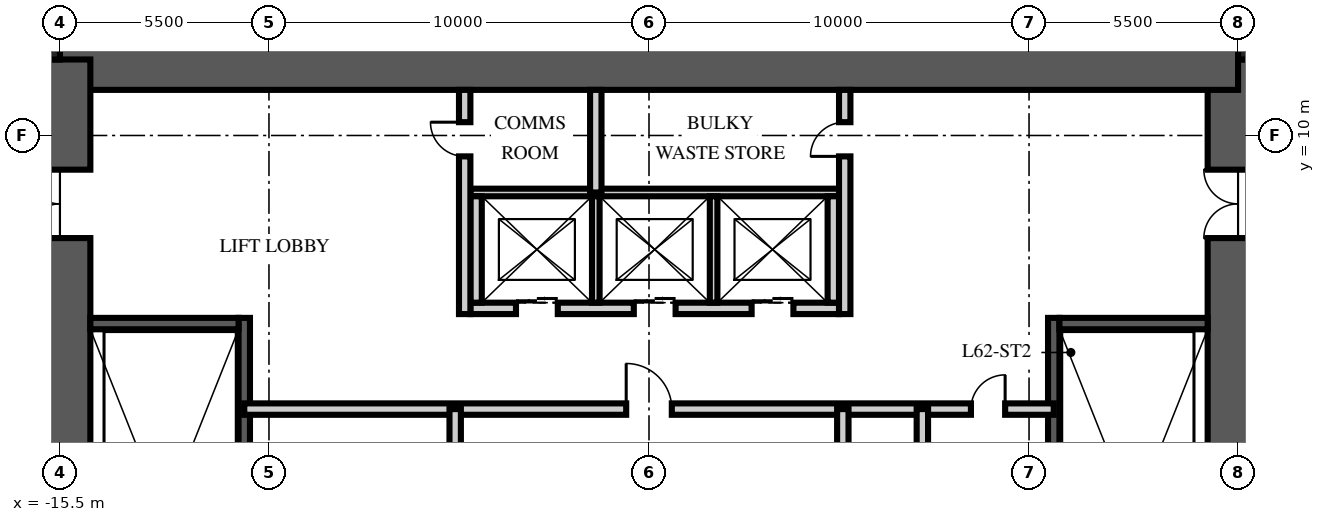
"""IFC4 building model, lengths in metres.
Left out: names, types, materials, properties, quantities, classifications, styles, units other than length and angle.
Written with IfcOpenShell. Run it as: python <this file> out.ifc"""

import sys

from ifc_helpers import new_model, si_unit, direction, frame, frame_2d, origin, origin_2d, place, context, subcontext, project, spatial, rectangle, extrude, element, fill, save


model = new_model("IFC4")
c1 = context("Model", 3, precision=1e-05, world=origin(), true_north=direction((0.0, 1.0)))
c2 = subcontext(c1, "Body", "Model", "MODEL_VIEW")
j1 = project(units=[si_unit("LENGTHUNIT", "METRE"), si_unit("PLANEANGLEUNIT", "RADIAN")], contexts=[c1])
p1 = place(None, origin())
s1 = spatial("IfcSite", under=j1, at=p1, CompositionType="ELEMENT")
p2 = place(p1, origin())
s2 = spatial("IfcBuilding", under=s1, at=p2, CompositionType="ELEMENT")
p3 = place(p2, frame((0.0, 0.0, 248.25)))
s3 = spatial("IfcBuildingStorey", under=s2, at=p3, CompositionType="ELEMENT", Elevation=248.25)
p4 = place(p3, frame((15.5, -12.0, -0.25), z_axis=(0.0, 0.0, 1.0), x_axis=(0.0, 1.0, 0.0)))
e1 = element("IfcWall", 1, at=p4, inside=s3, PredefinedType="SHEAR", context=c2, shape_type="SweptSolid", body=[
    extrude(rectangle(XDim=24.0, YDim=1.6, at=frame_2d((12.0, 0.0))), origin(), (0.0, 0.0, 1.0), 3.75),
])
p5 = place(p4, frame((3.2, 0.0, 0.25)))
e2 = element("IfcOpeningElement", 2, at=p5, cuts=e1, PredefinedType="OPENING", context=c2, shape_type="SweptSolid", body=[
    extrude(rectangle(XDim=1.2, YDim=2.1, at=frame_2d((0.6, 1.05))), frame((0.0, 0.81, 0.0), z_axis=(0.0, -1.0, 0.0), x_axis=(1.0, 0.0, 0.0)), (0.0, 0.0, 1.0), 1.62),
])
p6 = place(p4, frame((19.3, 0.0, 0.25)))
e3 = element("IfcOpeningElement", 3, at=p6, cuts=e1, PredefinedType="OPENING", context=c2, shape_type="SweptSolid", body=[
    extrude(rectangle(XDim=1.8, YDim=2.1, at=frame_2d((0.9, 1.05))), frame((0.0, 0.81, 0.0), z_axis=(0.0, -1.0, 0.0), x_axis=(1.0, 0.0, 0.0)), (0.0, 0.0, 1.0), 1.62),
])
p7 = place(p3, frame((-15.5, 12.0, -0.25), z_axis=(0.0, 0.0, 1.0), x_axis=(1.0, 0.0, 0.0)))
e4 = element("IfcWall", 4, at=p7, inside=s3, PredefinedType="SHEAR", context=c2, shape_type="SweptSolid", body=[
    extrude(rectangle(XDim=31.0, YDim=1.6, at=frame_2d((15.5, 0.0))), origin(), (0.0, 0.0, 1.0), 3.75),
])
p8 = place(p3, frame((-15.5, -12.0, -0.25), z_axis=(0.0, 0.0, 1.0), x_axis=(0.0, 1.0, 0.0)))
e5 = element("IfcWall", 5, at=p8, inside=s3, PredefinedType="SHEAR", context=c2, shape_type="SweptSolid", body=[
    extrude(rectangle(XDim=24.0, YDim=1.6, at=frame_2d((12.0, 0.0))), origin(), (0.0, 0.0, 1.0), 3.75),
])
p9 = place(p8, frame((3.2, 0.0, 0.25)))
e6 = element("IfcOpeningElement", 6, at=p9, cuts=e5, PredefinedType="OPENING", context=c2, shape_type="SweptSolid", body=[
    extrude(rectangle(XDim=1.2, YDim=2.1, at=frame_2d((0.6, 1.05))), frame((0.0, 0.81, 0.0), z_axis=(0.0, -1.0, 0.0), x_axis=(1.0, 0.0, 0.0)), (0.0, 0.0, 1.0), 1.62),
])
p10 = place(p8, frame((19.3, 0.0, 0.25)))
e7 = element("IfcOpeningElement", 7, at=p10, cuts=e5, PredefinedType="OPENING", context=c2, shape_type="SweptSolid", body=[
    extrude(rectangle(XDim=1.8, YDim=2.1, at=frame_2d((0.9, 1.05))), frame((0.0, 0.81, 0.0), z_axis=(0.0, -1.0, 0.0), x_axis=(1.0, 0.0, 0.0)), (0.0, 0.0, 1.0), 1.62),
])
for number, where, z_axis, x_axis in (
    (8, (15.9, 12.4, -0.25), (0.0, 0.0, 1.0), (1.0, 0.0, 0.0)),
    (9, (-15.9, 12.4, -0.25), (0.0, 0.0, 1.0), (1.0, 0.0, 0.0)),
):
    element("IfcColumn", number, at=place(p3, frame(where, z_axis=z_axis, x_axis=x_axis)), inside=s3, PredefinedType="COLUMN", context=c2, shape_type="SweptSolid", body=[
        extrude(rectangle(XDim=0.8, YDim=0.8, at=origin_2d()), origin(), (0.0, 0.0, 1.0), 3.75),
    ])
p11 = place(p3, frame((-10.65, -4.9, 0.0), z_axis=(0.0, 0.0, 1.0), x_axis=(0.0, 1.0, 0.0)))
e10 = element("IfcWall", 10, at=p11, inside=s3, PredefinedType="SOLIDWALL", context=c2, shape_type="SweptSolid", body=[
    extrude(rectangle(XDim=10.1, YDim=0.3, at=frame_2d((5.05, 0.0))), origin(), (0.0, 0.0, 1.0), 3.5),
])
p12 = place(p3, frame((-14.7, 5.05, 0.0), z_axis=(0.0, 0.0, 1.0), x_axis=(1.0, 0.0, 0.0)))
e11 = element("IfcWall", 11, at=p12, inside=s3, PredefinedType="SOLIDWALL", context=c2, shape_type="SweptSolid", body=[
    extrude(rectangle(XDim=3.9, YDim=0.3, at=frame_2d((1.95, 0.0))), origin(), (0.0, 0.0, 1.0), 3.5),
])
p13 = place(p3, frame((10.65, -4.9, 0.0), z_axis=(0.0, 0.0, 1.0), x_axis=(0.0, 1.0, 0.0)))
e12 = element("IfcWall", 12, at=p13, inside=s3, PredefinedType="SOLIDWALL", context=c2, shape_type="SweptSolid", body=[
    extrude(rectangle(XDim=10.1, YDim=0.3, at=frame_2d((5.05, 0.0))), origin(), (0.0, 0.0, 1.0), 3.5),
])
p14 = place(p3, frame((14.7, 5.05, 0.0), z_axis=(0.0, 0.0, 1.0), x_axis=(-1.0, 0.0, 0.0)))
e13 = element("IfcWall", 13, at=p14, inside=s3, PredefinedType="SOLIDWALL", context=c2, shape_type="SweptSolid", body=[
    extrude(rectangle(XDim=3.9, YDim=0.3, at=frame_2d((1.95, 0.0))), origin(), (0.0, 0.0, 1.0), 3.5),
])
p15 = place(p3, frame((-4.7, 5.45, 0.0), z_axis=(0.0, 0.0, 1.0), x_axis=(1.0, 0.0, 0.0)))
e14 = element("IfcWall", 14, at=p15, inside=s3, PredefinedType="PARTITIONING", context=c2, shape_type="SweptSolid", body=[
    extrude(rectangle(XDim=9.7, YDim=0.3, at=frame_2d((4.85, 0.0))), origin(), (0.0, 0.0, 1.0), 3.5),
])
p16 = place(p15, frame((1.2, 0.0, 0.0)))
e15 = element("IfcOpeningElement", 15, at=p16, cuts=e14, PredefinedType="OPENING", context=c2, shape_type="SweptSolid", body=[
    extrude(rectangle(XDim=1.1, YDim=2.1, at=frame_2d((0.55, 1.05))), frame((0.0, 0.16, 0.0), z_axis=(0.0, -1.0, 0.0), x_axis=(1.0, 0.0, 0.0)), (0.0, 0.0, 1.0), 0.32),
])
p17 = place(p15, frame((4.3, 0.0, 0.0)))
e16 = element("IfcOpeningElement", 16, at=p17, cuts=e14, PredefinedType="OPENING", context=c2, shape_type="SweptSolid", body=[
    extrude(rectangle(XDim=1.1, YDim=2.1, at=frame_2d((0.55, 1.05))), frame((0.0, 0.16, 0.0), z_axis=(0.0, -1.0, 0.0), x_axis=(1.0, 0.0, 0.0)), (0.0, 0.0, 1.0), 0.32),
])
p18 = place(p15, frame((7.4, 0.0, 0.0)))
e17 = element("IfcOpeningElement", 17, at=p18, cuts=e14, PredefinedType="OPENING", context=c2, shape_type="SweptSolid", body=[
    extrude(rectangle(XDim=1.1, YDim=2.1, at=frame_2d((0.55, 1.05))), frame((0.0, 0.16, 0.0), z_axis=(0.0, -1.0, 0.0), x_axis=(1.0, 0.0, 0.0)), (0.0, 0.0, 1.0), 0.32),
])
p19 = place(p3, frame((-4.7, 8.5, 0.0), z_axis=(0.0, 0.0, 1.0), x_axis=(1.0, 0.0, 0.0)))
e18 = element("IfcWall", 18, at=p19, inside=s3, PredefinedType="PARTITIONING", context=c2, shape_type="SweptSolid", body=[
    extrude(rectangle(XDim=9.7, YDim=0.2, at=frame_2d((4.85, 0.0))), origin(), (0.0, 0.0, 1.0), 3.5),
])
for number, where, z_axis, x_axis in (
    (19, (-4.55, 5.6, 0.0), (0.0, 0.0, 1.0), (0.0, 1.0, 0.0)),
    (20, (4.85, 5.6, 0.0), (0.0, 0.0, 1.0), (0.0, 1.0, 0.0)),
):
    element("IfcWall", number, at=place(p3, frame(where, z_axis=z_axis, x_axis=x_axis)), inside=s3, PredefinedType="PARTITIONING", context=c2, shape_type="SweptSolid", body=[
        extrude(rectangle(XDim=2.8, YDim=0.3, at=frame_2d((1.4, 0.0))), origin(), (0.0, 0.0, 1.0), 3.5),
    ])
for number, where, z_axis, x_axis in (
    (21, (-1.4, 5.6, 0.0), (0.0, 0.0, 1.0), (0.0, 1.0, 0.0)),
    (22, (1.7, 5.6, 0.0), (0.0, 0.0, 1.0), (0.0, 1.0, 0.0)),
):
    element("IfcWall", number, at=place(p3, frame(where, z_axis=z_axis, x_axis=x_axis)), inside=s3, PredefinedType="PARTITIONING", context=c2, shape_type="SweptSolid", body=[
        extrude(rectangle(XDim=2.8, YDim=0.2, at=frame_2d((1.4, 0.0))), origin(), (0.0, 0.0, 1.0), 3.5),
    ])
p20 = place(p3, frame((-10.65, 2.8, 0.0), z_axis=(0.0, 0.0, 1.0), x_axis=(1.0, 0.0, 0.0)))
e23 = element("IfcWall", 23, at=p20, inside=s3, PredefinedType="PARTITIONING", context=c2, shape_type="SweptSolid", body=[
    extrude(rectangle(XDim=21.3, YDim=0.3, at=frame_2d((10.65, 0.0))), origin(), (0.0, 0.0, 1.0), 3.5),
])
p21 = place(p20, frame((10.05, 0.0, 0.0)))
e24 = element("IfcOpeningElement", 24, at=p21, cuts=e23, PredefinedType="OPENING", context=c2, shape_type="SweptSolid", body=[
    extrude(rectangle(XDim=1.2, YDim=2.1, at=frame_2d((0.6, 1.05))), frame((0.0, 0.16, 0.0), z_axis=(0.0, -1.0, 0.0), x_axis=(1.0, 0.0, 0.0)), (0.0, 0.0, 1.0), 0.32),
])
p22 = place(p20, frame((19.121, 0.0, 0.0)))
e25 = element("IfcOpeningElement", 25, at=p22, cuts=e23, PredefinedType="OPENING", context=c2, shape_type="SweptSolid", body=[
    extrude(rectangle(XDim=0.9, YDim=2.1, at=frame_2d((0.45, 1.05))), frame((0.0, 0.16, 0.0), z_axis=(0.0, -1.0, 0.0), x_axis=(1.0, 0.0, 0.0)), (0.0, 0.0, 1.0), 0.32),
])
p23 = place(p3, frame((-5.1, -6.65, 0.0), z_axis=(0.0, 0.0, 1.0), x_axis=(0.0, 1.0, 0.0)))
e26 = element("IfcWall", 26, at=p23, inside=s3, PredefinedType="PARTITIONING", context=c2, shape_type="SweptSolid", body=[
    extrude(rectangle(XDim=9.45, YDim=0.3, at=frame_2d((4.725, 0.0))), origin(), (0.0, 0.0, 1.0), 3.5),
])
p24 = place(p23, frame((2.648, 0.0, 0.0)))
e27 = element("IfcOpeningElement", 27, at=p24, cuts=e26, PredefinedType="OPENING", context=c2, shape_type="SweptSolid", body=[
    extrude(rectangle(XDim=0.9, YDim=2.1, at=frame_2d((0.45, 1.05))), frame((0.0, 0.16, 0.0), z_axis=(0.0, -1.0, 0.0), x_axis=(1.0, 0.0, 0.0)), (0.0, 0.0, 1.0), 0.32),
])
p25 = place(p23, frame((7.373, 0.0, 0.0)))
e28 = element("IfcOpeningElement", 28, at=p25, cuts=e26, PredefinedType="OPENING", context=c2, shape_type="SweptSolid", body=[
    extrude(rectangle(XDim=0.9, YDim=2.1, at=frame_2d((0.45, 1.05))), frame((0.0, 0.16, 0.0), z_axis=(0.0, -1.0, 0.0), x_axis=(1.0, 0.0, 0.0)), (0.0, 0.0, 1.0), 0.32),
])
p26 = place(p3, frame((5.1, -6.65, 0.0), z_axis=(0.0, 0.0, 1.0), x_axis=(0.0, 1.0, 0.0)))
e29 = element("IfcWall", 29, at=p26, inside=s3, PredefinedType="PARTITIONING", context=c2, shape_type="SweptSolid", body=[
    extrude(rectangle(XDim=9.45, YDim=0.3, at=frame_2d((4.725, 0.0))), origin(), (0.0, 0.0, 1.0), 3.5),
])
p27 = place(p26, frame((4.275, 0.0, 0.0)))
e30 = element("IfcOpeningElement", 30, at=p27, cuts=e29, PredefinedType="OPENING", context=c2, shape_type="SweptSolid", body=[
    extrude(rectangle(XDim=0.9, YDim=2.1, at=frame_2d((0.45, 1.05))), frame((0.0, 0.16, 0.0), z_axis=(0.0, -1.0, 0.0), x_axis=(1.0, 0.0, 0.0)), (0.0, 0.0, 1.0), 0.32),
])
p28 = place(p3, frame((7.193, -6.65, 0.0), z_axis=(0.0, 0.0, 1.0), x_axis=(0.0, 1.0, 0.0)))
e31 = element("IfcWall", 31, at=p28, inside=s3, PredefinedType="PARTITIONING", context=c2, shape_type="SweptSolid", body=[
    extrude(rectangle(XDim=9.45, YDim=0.3, at=frame_2d((4.725, 0.0))), origin(), (0.0, 0.0, 1.0), 3.5),
])
p29 = place(p3, frame((-4.85, 5.3, 0.0), z_axis=(0.0, 0.0, 1.0), x_axis=(0.0, 1.0, 0.0)))
e32 = element("IfcWall", 32, at=p29, inside=s3, PredefinedType="PARTITIONING", context=c2, shape_type="SweptSolid", body=[
    extrude(rectangle(XDim=5.9, YDim=0.3, at=frame_2d((2.95, 0.0))), origin(), (0.0, 0.0, 1.0), 3.5),
])
p30 = place(p29, frame((4.15, 0.0, 0.0)))
e33 = element("IfcOpeningElement", 33, at=p30, cuts=e32, PredefinedType="OPENING", context=c2, shape_type="SweptSolid", body=[
    extrude(rectangle(XDim=0.9, YDim=2.1, at=frame_2d((0.45, 1.05))), frame((0.0, 0.16, 0.0), z_axis=(0.0, -1.0, 0.0), x_axis=(1.0, 0.0, 0.0)), (0.0, 0.0, 1.0), 0.32),
])
p31 = place(p3, frame((5.15, 5.3, 0.0), z_axis=(0.0, 0.0, 1.0), x_axis=(0.0, 1.0, 0.0)))
e34 = element("IfcWall", 34, at=p31, inside=s3, PredefinedType="PARTITIONING", context=c2, shape_type="SweptSolid", body=[
    extrude(rectangle(XDim=5.9, YDim=0.3, at=frame_2d((2.95, 0.0))), origin(), (0.0, 0.0, 1.0), 3.5),
])
p32 = place(p31, frame((4.15, 0.0, 0.0)))
e35 = element("IfcOpeningElement", 35, at=p32, cuts=e34, PredefinedType="OPENING", context=c2, shape_type="SweptSolid", body=[
    extrude(rectangle(XDim=0.9, YDim=2.1, at=frame_2d((0.45, 1.05))), frame((0.0, 0.16, 0.0), z_axis=(0.0, -1.0, 0.0), x_axis=(1.0, 0.0, 0.0)), (0.0, 0.0, 1.0), 0.32),
])
p33 = place(p3, frame((-1.4, 8.5, 0.0), z_axis=(0.0, 0.0, 1.0), x_axis=(0.0, 1.0, 0.0)))
e36 = element("IfcWall", 36, at=p33, inside=s3, PredefinedType="PARTITIONING", context=c2, shape_type="SweptSolid", body=[
    extrude(rectangle(XDim=2.7, YDim=0.3, at=frame_2d((1.35, 0.0))), origin(), (0.0, 0.0, 1.0), 3.5),
])
p34 = place(p10, origin())
e37 = element("IfcDoor", 37, at=p34, inside=s3, OperationType="DOUBLE_DOOR_SINGLE_SWING", PredefinedType="DOOR", context=c2, shape_type="SweptSolid", body=[
    extrude(rectangle(XDim=1.8, YDim=2.1, at=frame_2d((0.9, 1.05))), frame((0.0, 0.025, 0.0), z_axis=(0.0, -1.0, 0.0), x_axis=(1.0, 0.0, 0.0)), (0.0, 0.0, 1.0), 0.05),
])
fill(e7, e37)
p35 = place(p6, origin())
e38 = element("IfcDoor", 38, at=p35, inside=s3, OperationType="DOUBLE_DOOR_SINGLE_SWING", PredefinedType="DOOR", context=c2, shape_type="SweptSolid", body=[
    extrude(rectangle(XDim=1.8, YDim=2.1, at=frame_2d((0.9, 1.05))), frame((0.0, 0.025, 0.0), z_axis=(0.0, -1.0, 0.0), x_axis=(1.0, 0.0, 0.0)), (0.0, 0.0, 1.0), 0.05),
])
fill(e3, e38)
p36 = place(p16, origin())
e39 = element("IfcDoor", 39, at=p36, inside=s3, OperationType="DOUBLE_DOOR_SLIDING", PredefinedType="DOOR", context=c2, shape_type="SweptSolid", body=[
    extrude(rectangle(XDim=1.1, YDim=2.1, at=frame_2d((0.55, 1.05))), frame((0.0, 0.025, 0.0), z_axis=(0.0, -1.0, 0.0), x_axis=(1.0, 0.0, 0.0)), (0.0, 0.0, 1.0), 0.05),
])
fill(e15, e39)
p37 = place(p17, origin())
e40 = element("IfcDoor", 40, at=p37, inside=s3, OperationType="DOUBLE_DOOR_SLIDING", PredefinedType="DOOR", context=c2, shape_type="SweptSolid", body=[
    extrude(rectangle(XDim=1.1, YDim=2.1, at=frame_2d((0.55, 1.05))), frame((0.0, 0.025, 0.0), z_axis=(0.0, -1.0, 0.0), x_axis=(1.0, 0.0, 0.0)), (0.0, 0.0, 1.0), 0.05),
])
fill(e16, e40)
p38 = place(p18, origin())
e41 = element("IfcDoor", 41, at=p38, inside=s3, OperationType="DOUBLE_DOOR_SLIDING", PredefinedType="DOOR", context=c2, shape_type="SweptSolid", body=[
    extrude(rectangle(XDim=1.1, YDim=2.1, at=frame_2d((0.55, 1.05))), frame((0.0, 0.025, 0.0), z_axis=(0.0, -1.0, 0.0), x_axis=(1.0, 0.0, 0.0)), (0.0, 0.0, 1.0), 0.05),
])
fill(e17, e41)
p39 = place(p21, origin())
e42 = element("IfcDoor", 42, at=p39, inside=s3, OperationType="SINGLE_SWING_LEFT", PredefinedType="DOOR", context=c2, shape_type="SweptSolid", body=[
    extrude(rectangle(XDim=1.2, YDim=2.1, at=frame_2d((0.6, 1.05))), frame((0.0, 0.025, 0.0), z_axis=(0.0, -1.0, 0.0), x_axis=(1.0, 0.0, 0.0)), (0.0, 0.0, 1.0), 0.05),
])
fill(e24, e42)
p40 = place(p22, origin())
e43 = element("IfcDoor", 43, at=p40, inside=s3, OperationType="SINGLE_SWING_RIGHT", PredefinedType="DOOR", context=c2, shape_type="SweptSolid", body=[
    extrude(rectangle(XDim=0.9, YDim=2.1, at=frame_2d((0.45, 1.05))), frame((0.0, 0.025, 0.0), z_axis=(0.0, -1.0, 0.0), x_axis=(1.0, 0.0, 0.0)), (0.0, 0.0, 1.0), 0.05),
])
fill(e25, e43)
p41 = place(p30, origin())
e44 = element("IfcDoor", 44, at=p41, inside=s3, OperationType="SINGLE_SWING_RIGHT", PredefinedType="DOOR", context=c2, shape_type="SweptSolid", body=[
    extrude(rectangle(XDim=0.9, YDim=2.1, at=frame_2d((0.45, 1.05))), frame((0.0, 0.025, 0.0), z_axis=(0.0, -1.0, 0.0), x_axis=(1.0, 0.0, 0.0)), (0.0, 0.0, 1.0), 0.05),
])
fill(e33, e44)
p42 = place(p32, origin())
e45 = element("IfcDoor", 45, at=p42, inside=s3, OperationType="SINGLE_SWING_LEFT", PredefinedType="DOOR", context=c2, shape_type="SweptSolid", body=[
    extrude(rectangle(XDim=0.9, YDim=2.1, at=frame_2d((0.45, 1.05))), frame((0.0, 0.025, 0.0), z_axis=(0.0, -1.0, 0.0), x_axis=(1.0, 0.0, 0.0)), (0.0, 0.0, 1.0), 0.05),
])
fill(e35, e45)
save(model, sys.argv[1])
